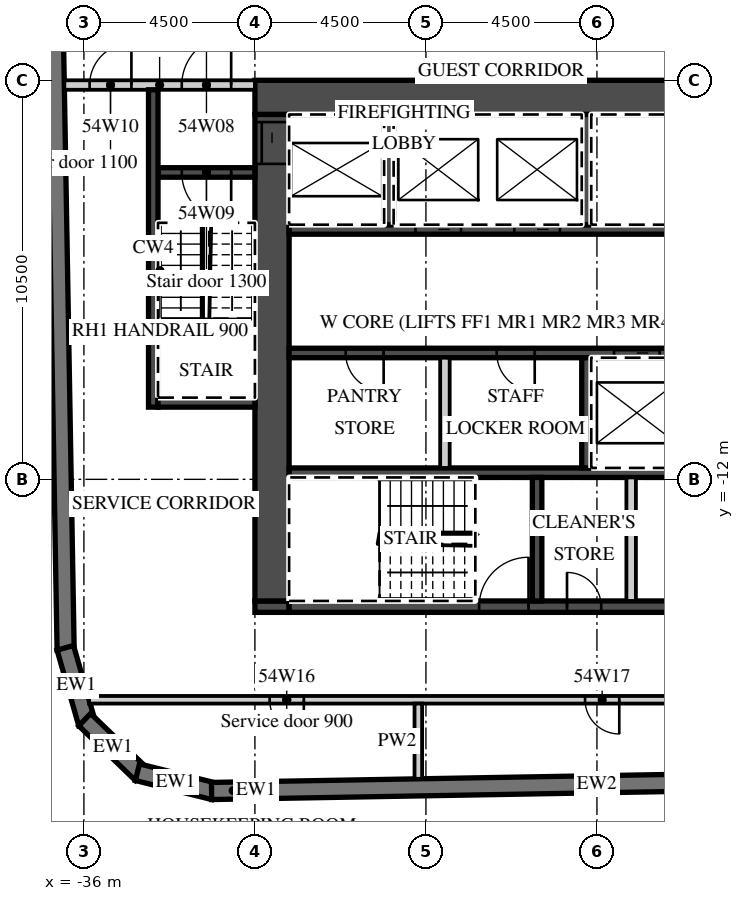
"""IFC4 building model, lengths in metres.
Left out: names, types, materials, properties, quantities, classifications, styles, units other than length and angle.
Written with IfcOpenShell. Run it as: python <this file> out.ifc"""

import sys

from ifc_helpers import new_model, si_unit, direction, frame, frame_2d, origin, place, context, subcontext, project, spatial, polyline, rectangle, outline, extrude, element, fill, save


model = new_model("IFC4")
c1 = context("Model", 3, precision=1e-05, world=origin(), true_north=direction((0.0, 1.0)))
c2 = subcontext(c1, "Body", "Model", "MODEL_VIEW")
j1 = project(units=[si_unit("LENGTHUNIT", "METRE"), si_unit("PLANEANGLEUNIT", "RADIAN")], contexts=[c1])
p1 = place(None, origin())
s1 = spatial("IfcSite", under=j1, at=p1, CompositionType="ELEMENT")
p2 = place(p1, origin())
s2 = spatial("IfcBuilding", under=s1, at=p2, CompositionType="ELEMENT")
p3 = place(p2, frame((0.0, 0.0, 224.3)))
s3 = spatial("IfcBuildingStorey", under=s2, at=p3, CompositionType="ELEMENT", Elevation=224.3)
p4 = place(p3, frame((-37.057, 16.503, 0.0), z_axis=(0.0, 0.0, 1.0), x_axis=(0.017452279857, -0.999847697366, 0.0)))
e1 = element("IfcWall", 1, at=p4, inside=s3, PredefinedType="SOLIDWALL", context=c2, shape_type="SweptSolid", body=[
    extrude(rectangle(XDim=33.0, YDim=0.45, at=frame_2d((16.5, 0.0))), origin(), (0.0, 0.0, 1.0), 3.02),
])
p5 = place(p3, frame((-36.49, -16.434, 0.0), z_axis=(0.0, 0.0, 1.0), x_axis=(0.275577603096, -0.961278827745, 0.0)))
e2 = element("IfcWall", 2, at=p5, inside=s3, PredefinedType="SOLIDWALL", context=c2, shape_type="SweptSolid", body=[
    extrude(outline(polyline([(0.0, -0.225), (2.071, -0.225), (1.95, 0.225), (0.121, 0.225), (0.0, -0.225)])), origin(), (0.0, 0.0, 1.0), 3.02),
])
p6 = place(p3, frame((-35.979, -18.324, 0.0), z_axis=(0.0, 0.0, 1.0), x_axis=(0.719320193998, -0.694678672846, 0.0)))
e3 = element("IfcWall", 3, at=p6, inside=s3, PredefinedType="SOLIDWALL", context=c2, shape_type="SweptSolid", body=[
    extrude(outline(polyline([(0.0, -0.225), (2.071, -0.225), (1.95, 0.225), (0.121, 0.225), (0.0, -0.225)])), origin(), (0.0, 0.0, 1.0), 3.02),
])
p7 = place(p3, frame((-34.591, -19.706, 0.0), z_axis=(0.0, 0.0, 1.0), x_axis=(0.970315655375, -0.241841950319, 0.0)))
e4 = element("IfcWall", 4, at=p7, inside=s3, PredefinedType="SOLIDWALL", context=c2, shape_type="SweptSolid", body=[
    extrude(outline(polyline([(0.0, -0.225), (2.071, -0.225), (1.95, 0.225), (0.121, 0.225), (0.0, -0.225)])), origin(), (0.0, 0.0, 1.0), 3.02),
])
p8 = place(p3, frame((-32.641, -20.2, 0.0), z_axis=(0.0, 0.0, 1.0), x_axis=(0.99984870815, 0.017394275206, 0.0)))
e5 = element("IfcWall", 5, at=p8, inside=s3, PredefinedType="SOLIDWALL", context=c2, shape_type="SweptSolid", body=[
    extrude(rectangle(XDim=1.137, YDim=0.45, at=frame_2d((0.568, 0.0))), origin(), (0.0, 0.0, 1.0), 3.02),
])
p9 = place(p3, frame((-31.504, -20.18, 0.0), z_axis=(0.0, 0.0, 1.0), x_axis=(0.999847677887, 0.017453395744, 0.0)))
e6 = element("IfcWall", 6, at=p9, inside=s3, PredefinedType="SOLIDWALL", context=c2, shape_type="SweptSolid", body=[
    extrude(rectangle(XDim=18.003, YDim=0.45, at=frame_2d((9.001, 0.0))), origin(), (0.0, 0.0, 1.0), 3.02),
])
p10 = place(p3, frame((-31.5, -1.95, 0.0), z_axis=(0.0, 0.0, 1.0), x_axis=(1.0, 0.0, 0.0)))
e7 = element("IfcWall", 7, at=p10, inside=s3, PredefinedType="SHEAR", context=c2, shape_type="SweptSolid", body=[
    extrude(rectangle(XDim=18.0, YDim=0.9, at=frame_2d((9.0, 0.0))), origin(), (0.0, 0.0, 1.0), 3.02),
])
p11 = place(p10, frame((14.725, 0.0, 0.0)))
e8 = element("IfcOpeningElement", 8, at=p11, cuts=e7, PredefinedType="OPENING", context=c2, shape_type="SweptSolid", body=[
    extrude(rectangle(XDim=1.8, YDim=2.1, at=frame_2d((0.9, 1.05))), frame((0.0, 0.46, 0.0), z_axis=(0.0, -1.0, 0.0), x_axis=(1.0, 0.0, 0.0)), (0.0, 0.0, 1.0), 0.92),
])
p12 = place(p3, frame((-31.5, -15.35, 0.0), z_axis=(0.0, 0.0, 1.0), x_axis=(1.0, 0.0, 0.0)))
e9 = element("IfcWall", 9, at=p12, inside=s3, PredefinedType="SHEAR", context=c2, shape_type="SweptSolid", body=[
    extrude(rectangle(XDim=0.9, YDim=0.3, at=frame_2d((0.45, 0.0))), origin(), (0.0, 0.0, 1.0), 3.02),
])
p13 = place(p3, frame((-30.6, -15.35, 0.0), z_axis=(0.0, 0.0, 1.0), x_axis=(1.0, 0.0, 0.0)))
e10 = element("IfcWall", 10, at=p13, inside=s3, PredefinedType="SHEAR", context=c2, shape_type="SweptSolid", body=[
    extrude(rectangle(XDim=10.3, YDim=0.3, at=frame_2d((5.15, 0.0))), origin(), (0.0, 0.0, 1.0), 3.02),
])
p14 = place(p13, frame((5.0, 0.0, 0.0)))
e11 = element("IfcOpeningElement", 11, at=p14, cuts=e10, PredefinedType="OPENING", context=c2, shape_type="SweptSolid", body=[
    extrude(rectangle(XDim=1.3, YDim=2.1, at=frame_2d((0.65, 1.05))), frame((0.0, 0.16, 0.0), z_axis=(0.0, -1.0, 0.0), x_axis=(1.0, 0.0, 0.0)), (0.0, 0.0, 1.0), 0.32),
])
p15 = place(p13, frame((7.312, 0.0, 0.0)))
e12 = element("IfcOpeningElement", 12, at=p15, cuts=e10, PredefinedType="OPENING", context=c2, shape_type="SweptSolid", body=[
    extrude(rectangle(XDim=0.9, YDim=2.1, at=frame_2d((0.45, 1.05))), frame((0.0, 0.16, 0.0), z_axis=(0.0, -1.0, 0.0), x_axis=(1.0, 0.0, 0.0)), (0.0, 0.0, 1.0), 0.32),
])
p16 = place(p3, frame((-31.05, -15.2, 0.0), z_axis=(0.0, 0.0, 1.0), x_axis=(0.0, 1.0, 0.0)))
e13 = element("IfcWall", 13, at=p16, inside=s3, PredefinedType="SHEAR", context=c2, shape_type="SweptSolid", body=[
    extrude(rectangle(XDim=12.8, YDim=0.9, at=frame_2d((6.4, 0.0))), origin(), (0.0, 0.0, 1.0), 3.02),
])
p17 = place(p16, frame((11.5, 0.0, 0.0)))
e14 = element("IfcOpeningElement", 14, at=p17, cuts=e13, PredefinedType="OPENING", context=c2, shape_type="SweptSolid", body=[
    extrude(rectangle(XDim=1.1, YDim=2.1, at=frame_2d((0.55, 1.05))), frame((0.0, 0.46, 0.0), z_axis=(0.0, -1.0, 0.0), x_axis=(1.0, 0.0, 0.0)), (0.0, 0.0, 1.0), 0.92),
])
p18 = place(p3, frame((-30.6, -5.425, 0.0), z_axis=(0.0, 0.0, 1.0), x_axis=(1.0, 0.0, 0.0)))
e15 = element("IfcWall", 15, at=p18, inside=s3, PredefinedType="SHEAR", context=c2, shape_type="SweptSolid", body=[
    extrude(rectangle(XDim=13.0, YDim=0.25, at=frame_2d((6.5, 0.0))), origin(), (0.0, 0.0, 1.0), 3.02),
])
p19 = place(p18, frame((3.325, 0.0, 0.0)))
e16 = element("IfcOpeningElement", 16, at=p19, cuts=e15, PredefinedType="OPENING", context=c2, shape_type="SweptSolid", body=[
    extrude(rectangle(XDim=1.2, YDim=2.1, at=frame_2d((0.6, 1.05))), frame((0.0, 0.135, 0.0), z_axis=(0.0, -1.0, 0.0), x_axis=(1.0, 0.0, 0.0)), (0.0, 0.0, 1.0), 0.27),
])
p20 = place(p18, frame((5.925, 0.0, 0.0)))
e17 = element("IfcOpeningElement", 17, at=p20, cuts=e15, PredefinedType="OPENING", context=c2, shape_type="SweptSolid", body=[
    extrude(rectangle(XDim=1.2, YDim=2.1, at=frame_2d((0.6, 1.05))), frame((0.0, 0.135, 0.0), z_axis=(0.0, -1.0, 0.0), x_axis=(1.0, 0.0, 0.0)), (0.0, 0.0, 1.0), 0.27),
])
for number, where, z_axis, x_axis in (
    (18, (-27.975, -5.3, 0.0), (0.0, 0.0, 1.0), (0.0, 1.0, 0.0)),
    (19, (-22.775, -5.3, 0.0), (0.0, 0.0, 1.0), (0.0, 1.0, 0.0)),
):
    element("IfcWall", number, at=place(p3, frame(where, z_axis=z_axis, x_axis=x_axis)), inside=s3, PredefinedType="SHEAR", context=c2, shape_type="SweptSolid", body=[
        extrude(rectangle(XDim=2.9, YDim=0.25, at=frame_2d((1.45, 0.0))), origin(), (0.0, 0.0, 1.0), 3.02),
    ])
p21 = place(p3, frame((-30.6, -8.675, 0.0), z_axis=(0.0, 0.0, 1.0), x_axis=(1.0, 0.0, 0.0)))
e20 = element("IfcWall", 20, at=p21, inside=s3, PredefinedType="SHEAR", context=c2, shape_type="SweptSolid", body=[
    extrude(rectangle(XDim=16.2, YDim=0.25, at=frame_2d((8.1, 0.0))), origin(), (0.0, 0.0, 1.0), 3.02),
])
p22 = place(p21, frame((8.55, 0.0, 0.0)))
e21 = element("IfcOpeningElement", 21, at=p22, cuts=e20, PredefinedType="OPENING", context=c2, shape_type="SweptSolid", body=[
    extrude(rectangle(XDim=1.2, YDim=2.1, at=frame_2d((0.6, 1.05))), frame((0.0, 0.135, 0.0), z_axis=(0.0, -1.0, 0.0), x_axis=(1.0, 0.0, 0.0)), (0.0, 0.0, 1.0), 0.27),
])
p23 = place(p21, frame((11.2, 0.0, 0.0)))
e22 = element("IfcOpeningElement", 22, at=p23, cuts=e20, PredefinedType="OPENING", context=c2, shape_type="SweptSolid", body=[
    extrude(rectangle(XDim=1.2, YDim=2.1, at=frame_2d((0.6, 1.05))), frame((0.0, 0.135, 0.0), z_axis=(0.0, -1.0, 0.0), x_axis=(1.0, 0.0, 0.0)), (0.0, 0.0, 1.0), 0.27),
])
p24 = place(p21, frame((14.25, 0.0, 0.0)))
e23 = element("IfcOpeningElement", 23, at=p24, cuts=e20, PredefinedType="OPENING", context=c2, shape_type="SweptSolid", body=[
    extrude(rectangle(XDim=1.3, YDim=2.1, at=frame_2d((0.65, 1.05))), frame((0.0, 0.135, 0.0), z_axis=(0.0, -1.0, 0.0), x_axis=(1.0, 0.0, 0.0)), (0.0, 0.0, 1.0), 0.27),
])
p25 = place(p21, frame((1.488, 0.0, 0.0)))
e24 = element("IfcOpeningElement", 24, at=p25, cuts=e20, PredefinedType="OPENING", context=c2, shape_type="SweptSolid", body=[
    extrude(rectangle(XDim=1.0, YDim=2.1, at=frame_2d((0.5, 1.05))), frame((0.0, 0.135, 0.0), z_axis=(0.0, -1.0, 0.0), x_axis=(1.0, 0.0, 0.0)), (0.0, 0.0, 1.0), 0.27),
])
p26 = place(p21, frame((5.462, 0.0, 0.0)))
e25 = element("IfcOpeningElement", 25, at=p26, cuts=e20, PredefinedType="OPENING", context=c2, shape_type="SweptSolid", body=[
    extrude(rectangle(XDim=1.0, YDim=2.1, at=frame_2d((0.5, 1.05))), frame((0.0, 0.135, 0.0), z_axis=(0.0, -1.0, 0.0), x_axis=(1.0, 0.0, 0.0)), (0.0, 0.0, 1.0), 0.27),
])
p27 = place(p3, frame((-30.6, -11.825, 0.0), z_axis=(0.0, 0.0, 1.0), x_axis=(1.0, 0.0, 0.0)))
e26 = element("IfcWall", 26, at=p27, inside=s3, PredefinedType="SHEAR", context=c2, shape_type="SweptSolid", body=[
    extrude(rectangle(XDim=13.25, YDim=0.25, at=frame_2d((6.625, 0.0))), origin(), (0.0, 0.0, 1.0), 3.02),
])
p28 = place(p3, frame((-22.775, -11.7, 0.0), z_axis=(0.0, 0.0, 1.0), x_axis=(0.0, 1.0, 0.0)))
e27 = element("IfcWall", 27, at=p28, inside=s3, PredefinedType="SHEAR", context=c2, shape_type="SweptSolid", body=[
    extrude(rectangle(XDim=2.9, YDim=0.25, at=frame_2d((1.45, 0.0))), origin(), (0.0, 0.0, 1.0), 3.02),
])
p29 = place(p3, frame((-26.5, -11.7, 0.0), z_axis=(0.0, 0.0, 1.0), x_axis=(0.0, 1.0, 0.0)))
e28 = element("IfcWall", 28, at=p29, inside=s3, PredefinedType="PARTITIONING", context=c2, shape_type="SweptSolid", body=[
    extrude(rectangle(XDim=2.9, YDim=0.25, at=frame_2d((1.45, 0.0))), origin(), (0.0, 0.0, 1.0), 3.02),
])
p30 = place(p3, frame((-24.075, -15.2, 0.0), z_axis=(0.0, 0.0, 1.0), x_axis=(0.0, 1.0, 0.0)))
e29 = element("IfcWall", 29, at=p30, inside=s3, PredefinedType="SHEAR", context=c2, shape_type="SweptSolid", body=[
    extrude(rectangle(XDim=3.25, YDim=0.25, at=frame_2d((1.625, 0.0))), origin(), (0.0, 0.0, 1.0), 3.02),
])
p31 = place(p3, frame((-21.6, -15.2, 0.0), z_axis=(0.0, 0.0, 1.0), x_axis=(0.0, 1.0, 0.0)))
e30 = element("IfcWall", 30, at=p31, inside=s3, PredefinedType="PARTITIONING", context=c2, shape_type="SweptSolid", body=[
    extrude(rectangle(XDim=3.25, YDim=0.25, at=frame_2d((1.625, 0.0))), origin(), (0.0, 0.0, 1.0), 3.02),
])
p32 = place(p3, frame((-36.515, -1.625, 0.0), z_axis=(0.0, 0.0, 1.0), x_axis=(1.0, 0.0, 0.0)))
e31 = element("IfcWall", 31, at=p32, inside=s3, PredefinedType="PARTITIONING", context=c2, shape_type="SweptSolid", body=[
    extrude(rectangle(XDim=5.015, YDim=0.25, at=frame_2d((2.508, 0.0))), origin(), (0.0, 0.0, 1.0), 3.02),
])
p33 = place(p32, frame((3.09, 0.0, 0.0)))
e32 = element("IfcOpeningElement", 32, at=p33, cuts=e31, PredefinedType="OPENING", context=c2, shape_type="SweptSolid", body=[
    extrude(rectangle(XDim=1.3, YDim=2.1, at=frame_2d((0.65, 1.05))), frame((0.0, 0.135, 0.0), z_axis=(0.0, -1.0, 0.0), x_axis=(1.0, 0.0, 0.0)), (0.0, 0.0, 1.0), 0.27),
])
p34 = place(p32, frame((0.665, 0.0, 0.0)))
e33 = element("IfcOpeningElement", 33, at=p34, cuts=e31, PredefinedType="OPENING", context=c2, shape_type="SweptSolid", body=[
    extrude(rectangle(XDim=1.1, YDim=2.1, at=frame_2d((0.55, 1.05))), frame((0.0, 0.135, 0.0), z_axis=(0.0, -1.0, 0.0), x_axis=(1.0, 0.0, 0.0)), (0.0, 0.0, 1.0), 0.27),
])
p35 = place(p3, frame((-34.05, -3.925, 0.0), z_axis=(0.0, 0.0, 1.0), x_axis=(1.0, 0.0, 0.0)))
e34 = element("IfcWall", 34, at=p35, inside=s3, PredefinedType="SHEAR", context=c2, shape_type="SweptSolid", body=[
    extrude(rectangle(XDim=2.55, YDim=0.25, at=frame_2d((1.275, 0.0))), origin(), (0.0, 0.0, 1.0), 3.02),
])
p36 = place(p35, frame((0.625, 0.0, 0.0)))
e35 = element("IfcOpeningElement", 35, at=p36, cuts=e34, PredefinedType="OPENING", context=c2, shape_type="SweptSolid", body=[
    extrude(rectangle(XDim=1.3, YDim=2.1, at=frame_2d((0.65, 1.05))), frame((0.0, 0.135, 0.0), z_axis=(0.0, -1.0, 0.0), x_axis=(1.0, 0.0, 0.0)), (0.0, 0.0, 1.0), 0.27),
])
p37 = place(p3, frame((-34.175, -10.1, 0.0), z_axis=(0.0, 0.0, 1.0), x_axis=(0.0, 1.0, 0.0)))
e36 = element("IfcWall", 36, at=p37, inside=s3, PredefinedType="SHEAR", context=c2, shape_type="SweptSolid", body=[
    extrude(rectangle(XDim=8.35, YDim=0.25, at=frame_2d((4.175, 0.0))), origin(), (0.0, 0.0, 1.0), 3.02),
])
p38 = place(p3, frame((-34.05, -9.975, 0.0), z_axis=(0.0, 0.0, 1.0), x_axis=(1.0, 0.0, 0.0)))
e37 = element("IfcWall", 37, at=p38, inside=s3, PredefinedType="SHEAR", context=c2, shape_type="SweptSolid", body=[
    extrude(rectangle(XDim=2.55, YDim=0.25, at=frame_2d((1.275, 0.0))), origin(), (0.0, 0.0, 1.0), 3.02),
])
p39 = place(p3, frame((-35.864, -17.8, 0.0), z_axis=(0.0, 0.0, 1.0), x_axis=(1.0, 0.0, 0.0)))
e38 = element("IfcWall", 38, at=p39, inside=s3, PredefinedType="PARTITIONING", context=c2, shape_type="SweptSolid", body=[
    extrude(rectangle(XDim=22.264, YDim=0.2, at=frame_2d((11.132, 0.0))), origin(), (0.0, 0.0, 1.0), 3.02),
])
p40 = place(p39, frame((4.751, 0.0, 0.0)))
e39 = element("IfcOpeningElement", 39, at=p40, cuts=e38, PredefinedType="OPENING", context=c2, shape_type="SweptSolid", body=[
    extrude(rectangle(XDim=0.9, YDim=2.1, at=frame_2d((0.45, 1.05))), frame((0.0, 0.11, 0.0), z_axis=(0.0, -1.0, 0.0), x_axis=(1.0, 0.0, 0.0)), (0.0, 0.0, 1.0), 0.22),
])
p41 = place(p39, frame((13.051, 0.0, 0.0)))
e40 = element("IfcOpeningElement", 40, at=p41, cuts=e38, PredefinedType="OPENING", context=c2, shape_type="SweptSolid", body=[
    extrude(rectangle(XDim=0.9, YDim=2.1, at=frame_2d((0.45, 1.05))), frame((0.0, 0.11, 0.0), z_axis=(0.0, -1.0, 0.0), x_axis=(1.0, 0.0, 0.0)), (0.0, 0.0, 1.0), 0.22),
])
p42 = place(p3, frame((-27.2, -19.88, 0.0), z_axis=(0.0, 0.0, 1.0), x_axis=(0.0, 1.0, 0.0)))
e41 = element("IfcWall", 41, at=p42, inside=s3, PredefinedType="PARTITIONING", context=c2, shape_type="SweptSolid", body=[
    extrude(rectangle(XDim=1.98, YDim=0.2, at=frame_2d((0.99, 0.0))), origin(), (0.0, 0.0, 1.0), 3.02),
])
p43 = place(p22, origin())
e42 = element("IfcDoor", 42, at=p43, inside=s3, OperationType="SLIDING_TO_LEFT", PredefinedType="DOOR", context=c2, shape_type="SweptSolid", body=[
    extrude(rectangle(XDim=1.2, YDim=2.1, at=frame_2d((0.6, 1.05))), frame((0.0, 0.025, 0.0), z_axis=(0.0, -1.0, 0.0), x_axis=(1.0, 0.0, 0.0)), (0.0, 0.0, 1.0), 0.05),
])
fill(e21, e42)
p44 = place(p19, origin())
e43 = element("IfcDoor", 43, at=p44, inside=s3, OperationType="SLIDING_TO_RIGHT", PredefinedType="DOOR", context=c2, shape_type="SweptSolid", body=[
    extrude(rectangle(XDim=1.2, YDim=2.1, at=frame_2d((0.6, 1.05))), frame((0.0, 0.025, 0.0), z_axis=(0.0, -1.0, 0.0), x_axis=(1.0, 0.0, 0.0)), (0.0, 0.0, 1.0), 0.05),
])
fill(e16, e43)
p45 = place(p20, origin())
e44 = element("IfcDoor", 44, at=p45, inside=s3, OperationType="SLIDING_TO_RIGHT", PredefinedType="DOOR", context=c2, shape_type="SweptSolid", body=[
    extrude(rectangle(XDim=1.2, YDim=2.1, at=frame_2d((0.6, 1.05))), frame((0.0, 0.025, 0.0), z_axis=(0.0, -1.0, 0.0), x_axis=(1.0, 0.0, 0.0)), (0.0, 0.0, 1.0), 0.05),
])
fill(e17, e44)
p46 = place(p17, origin())
e45 = element("IfcDoor", 45, at=p46, inside=s3, OperationType="SLIDING_TO_RIGHT", PredefinedType="DOOR", context=c2, shape_type="SweptSolid", body=[
    extrude(rectangle(XDim=1.1, YDim=2.1, at=frame_2d((0.55, 1.05))), frame((0.0, 0.025, 0.0), z_axis=(0.0, -1.0, 0.0), x_axis=(1.0, 0.0, 0.0)), (0.0, 0.0, 1.0), 0.05),
])
fill(e14, e45)
p47 = place(p33, origin())
e46 = element("IfcDoor", 46, at=p47, inside=s3, OperationType="SINGLE_SWING_RIGHT", PredefinedType="DOOR", context=c2, shape_type="SweptSolid", body=[
    extrude(rectangle(XDim=1.3, YDim=2.1, at=frame_2d((0.65, 1.05))), frame((0.0, 0.025, 0.0), z_axis=(0.0, -1.0, 0.0), x_axis=(1.0, 0.0, 0.0)), (0.0, 0.0, 1.0), 0.05),
])
fill(e32, e46)
p48 = place(p36, origin())
e47 = element("IfcDoor", 47, at=p48, inside=s3, OperationType="SINGLE_SWING_RIGHT", PredefinedType="DOOR", context=c2, shape_type="SweptSolid", body=[
    extrude(rectangle(XDim=1.3, YDim=2.1, at=frame_2d((0.65, 1.05))), frame((0.0, 0.025, 0.0), z_axis=(0.0, -1.0, 0.0), x_axis=(1.0, 0.0, 0.0)), (0.0, 0.0, 1.0), 0.05),
])
fill(e35, e47)
p49 = place(p34, origin())
e48 = element("IfcDoor", 48, at=p49, inside=s3, OperationType="SINGLE_SWING_RIGHT", PredefinedType="DOOR", context=c2, shape_type="SweptSolid", body=[
    extrude(rectangle(XDim=1.1, YDim=2.1, at=frame_2d((0.55, 1.05))), frame((0.0, 0.025, 0.0), z_axis=(0.0, -1.0, 0.0), x_axis=(1.0, 0.0, 0.0)), (0.0, 0.0, 1.0), 0.05),
])
fill(e33, e48)
p50 = place(p14, origin())
e49 = element("IfcDoor", 49, at=p50, inside=s3, OperationType="SINGLE_SWING_RIGHT", PredefinedType="DOOR", context=c2, shape_type="SweptSolid", body=[
    extrude(rectangle(XDim=1.3, YDim=2.1, at=frame_2d((0.65, 1.05))), frame((0.0, 0.025, 0.0), z_axis=(0.0, -1.0, 0.0), x_axis=(1.0, 0.0, 0.0)), (0.0, 0.0, 1.0), 0.05),
])
fill(e11, e49)
p51 = place(p15, origin())
e50 = element("IfcDoor", 50, at=p51, inside=s3, OperationType="SINGLE_SWING_LEFT", PredefinedType="DOOR", context=c2, shape_type="SweptSolid", body=[
    extrude(rectangle(XDim=0.9, YDim=2.1, at=frame_2d((0.45, 1.05))), frame((0.0, 0.025, 0.0), z_axis=(0.0, -1.0, 0.0), x_axis=(1.0, 0.0, 0.0)), (0.0, 0.0, 1.0), 0.05),
])
fill(e12, e50)
p52 = place(p25, origin())
e51 = element("IfcDoor", 51, at=p52, inside=s3, OperationType="SINGLE_SWING_RIGHT", PredefinedType="DOOR", context=c2, shape_type="SweptSolid", body=[
    extrude(rectangle(XDim=1.0, YDim=2.1, at=frame_2d((0.5, 1.05))), frame((0.0, 0.025, 0.0), z_axis=(0.0, -1.0, 0.0), x_axis=(1.0, 0.0, 0.0)), (0.0, 0.0, 1.0), 0.05),
])
fill(e24, e51)
p53 = place(p26, origin())
e52 = element("IfcDoor", 52, at=p53, inside=s3, OperationType="SINGLE_SWING_RIGHT", PredefinedType="DOOR", context=c2, shape_type="SweptSolid", body=[
    extrude(rectangle(XDim=1.0, YDim=2.1, at=frame_2d((0.5, 1.05))), frame((0.0, 0.025, 0.0), z_axis=(0.0, -1.0, 0.0), x_axis=(1.0, 0.0, 0.0)), (0.0, 0.0, 1.0), 0.05),
])
fill(e25, e52)
p54 = place(p40, origin())
e53 = element("IfcDoor", 53, at=p54, inside=s3, OperationType="SINGLE_SWING_RIGHT", PredefinedType="DOOR", context=c2, shape_type="SweptSolid", body=[
    extrude(rectangle(XDim=0.9, YDim=2.1, at=frame_2d((0.45, 1.05))), frame((0.0, 0.025, 0.0), z_axis=(0.0, -1.0, 0.0), x_axis=(1.0, 0.0, 0.0)), (0.0, 0.0, 1.0), 0.05),
])
fill(e39, e53)
p55 = place(p41, origin())
e54 = element("IfcDoor", 54, at=p55, inside=s3, OperationType="SINGLE_SWING_RIGHT", PredefinedType="DOOR", context=c2, shape_type="SweptSolid", body=[
    extrude(rectangle(XDim=0.9, YDim=2.1, at=frame_2d((0.45, 1.05))), frame((0.0, 0.025, 0.0), z_axis=(0.0, -1.0, 0.0), x_axis=(1.0, 0.0, 0.0)), (0.0, 0.0, 1.0), 0.05),
])
fill(e40, e54)
save(model, sys.argv[1])
